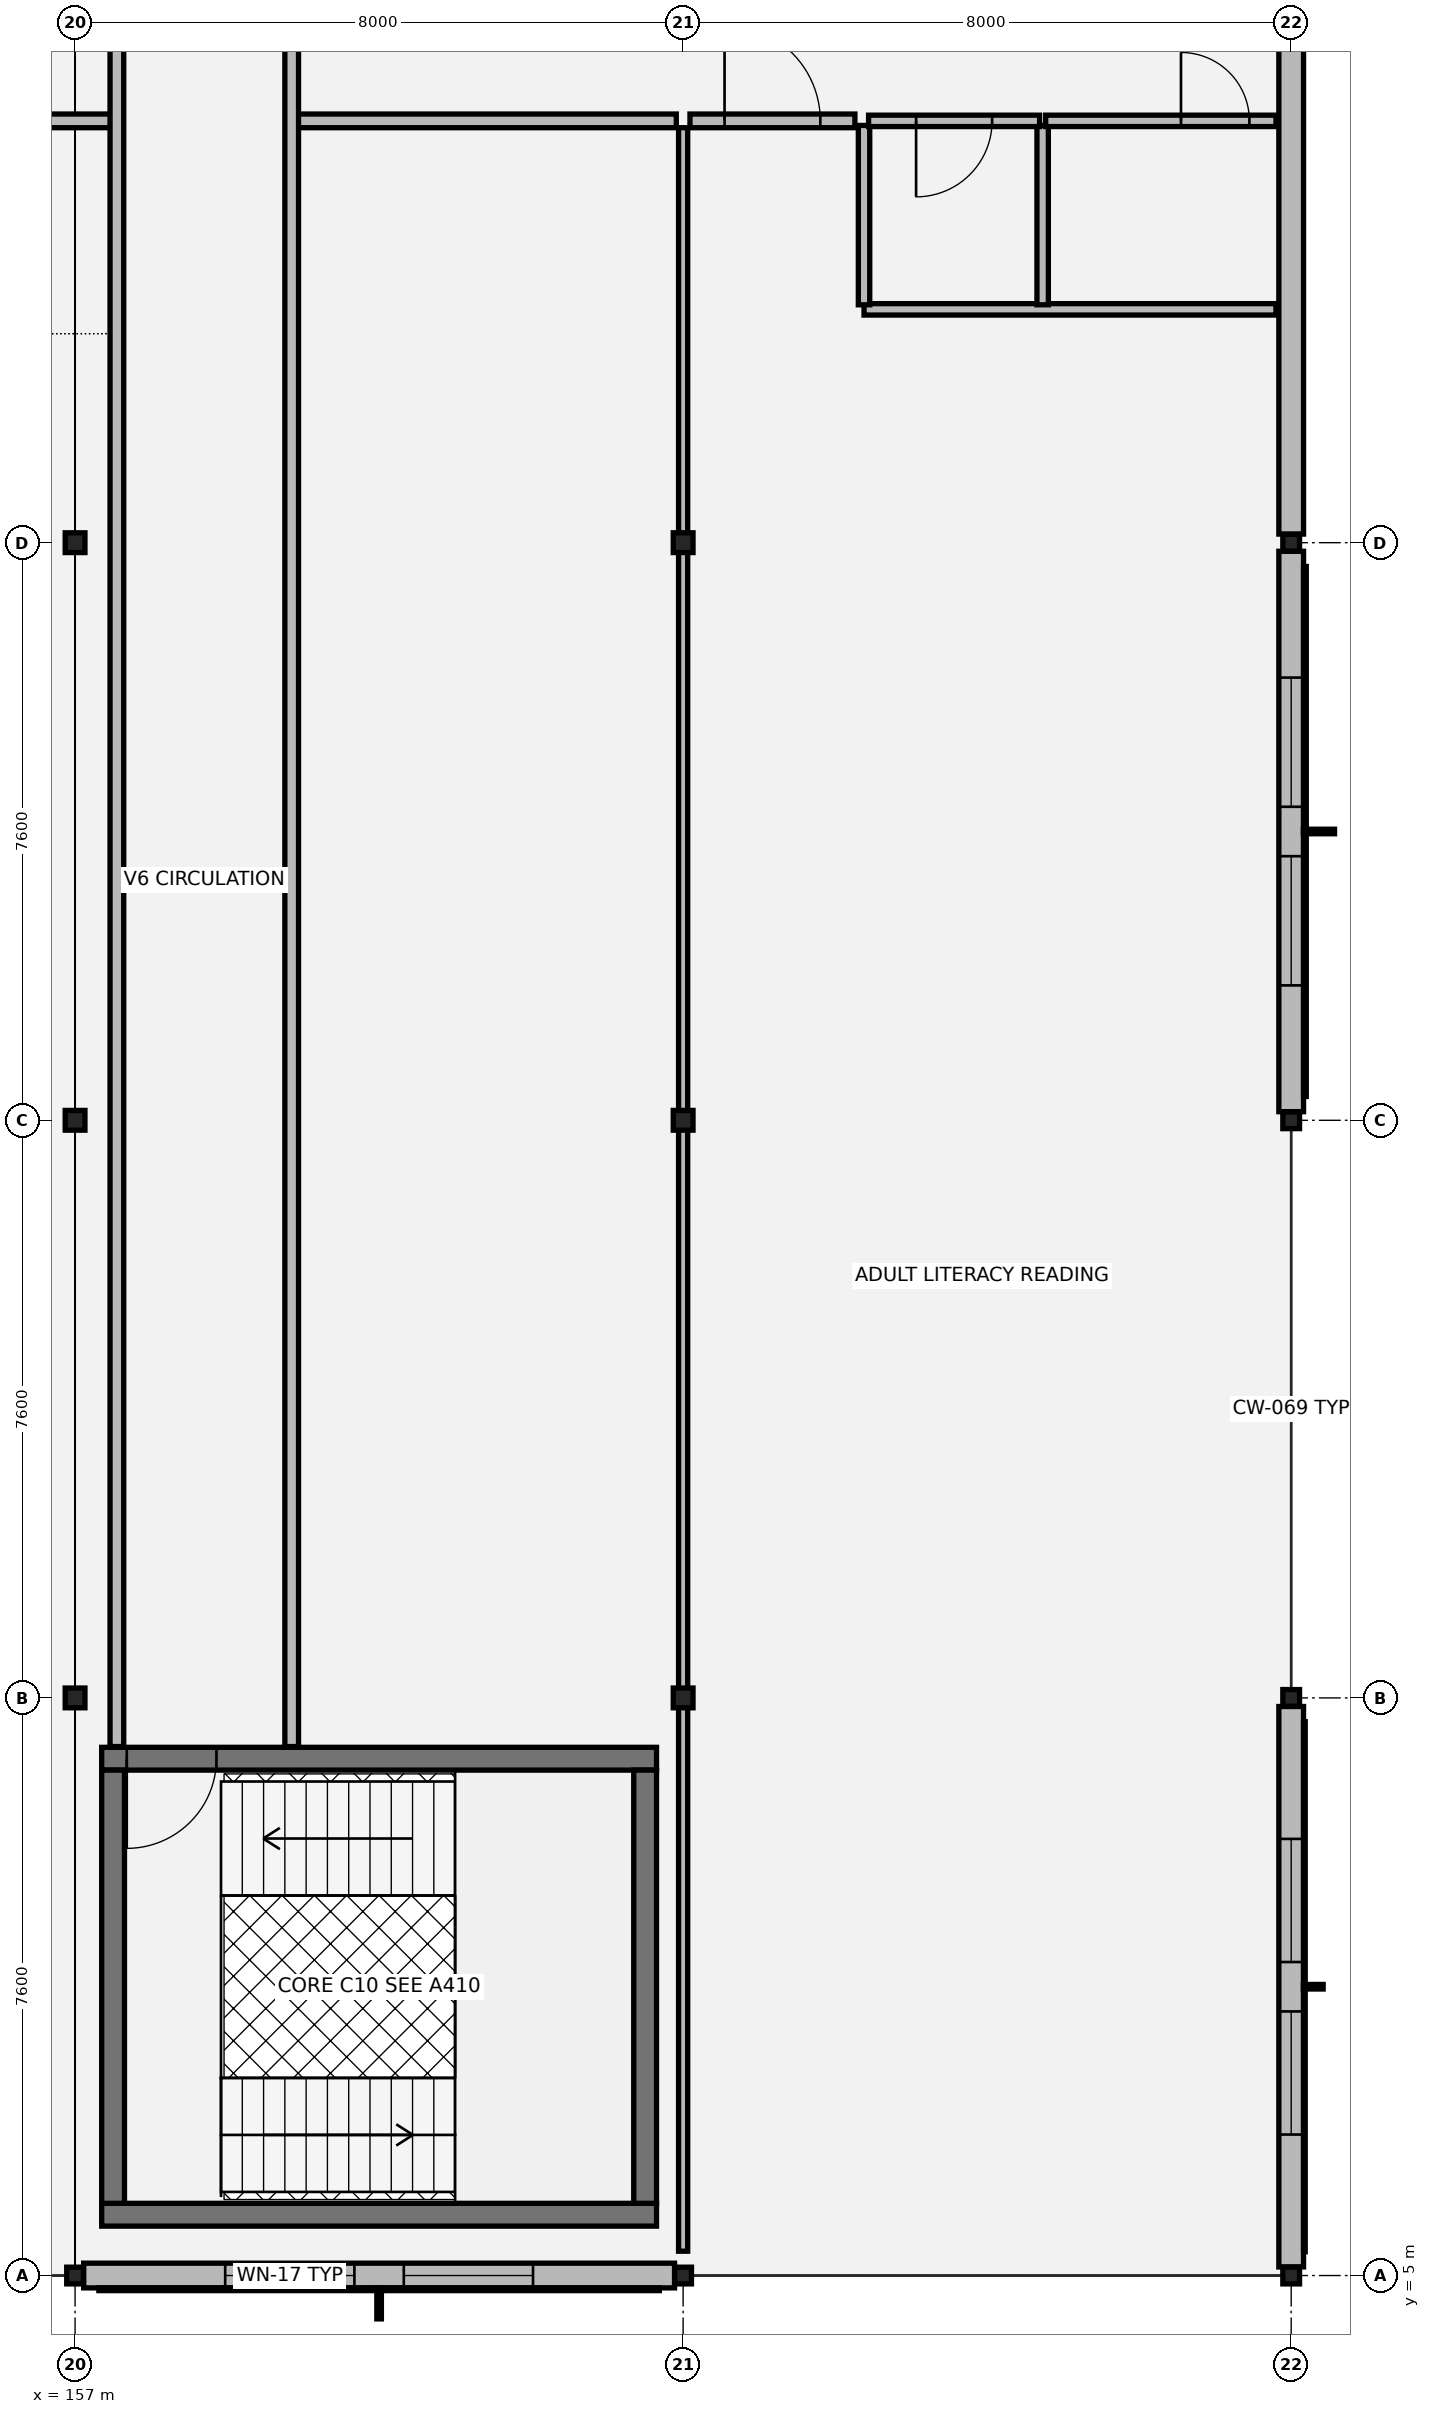
"""IFC4 building model, lengths in metres.
Left out: names, types, materials, properties, quantities, classifications, styles, units other than length and angle.
Written with IfcOpenShell. Run it as: python <this file> out.ifc"""

import sys

from ifc_helpers import new_model, si_unit, direction, frame, frame_2d, origin, origin_2d, place, context, subcontext, project, spatial, rectangle, hollow_rectangle, i_section, extrude, element, fill, save


model = new_model("IFC4")
c1 = context("Model", 3, precision=1e-05, world=origin(), true_north=direction((0.0, 1.0)))
c2 = subcontext(c1, "Body", "Model", "MODEL_VIEW")
j1 = project(units=[si_unit("LENGTHUNIT", "METRE"), si_unit("PLANEANGLEUNIT", "RADIAN")], contexts=[c1])
p1 = place(None, origin())
s1 = spatial("IfcSite", under=j1, at=p1, CompositionType="ELEMENT")
p2 = place(p1, origin())
s2 = spatial("IfcBuilding", under=s1, at=p2, CompositionType="ELEMENT")
p3 = place(p2, frame((0.0, 0.0, 13.26)))
s3 = spatial("IfcBuildingStorey", under=s2, at=p3, CompositionType="ELEMENT", Elevation=13.26)
p4 = place(p3, frame((157.0, 5.0, 0.0), z_axis=(0.0, 0.0, 1.0), x_axis=(1.0, 0.0, 0.0)))
e1 = element("IfcColumn", 1, at=p4, inside=s3, PredefinedType="COLUMN", context=c2, shape_type="SweptSolid", body=[
    extrude(hollow_rectangle(XDim=0.22, YDim=0.22, WallThickness=0.01, at=origin_2d()), origin(), (0.0, 0.0, 1.0), 4.055),
])
for number, where, z_axis, x_axis in (
    (2, (157.0, 12.6, 0.0), (0.0, 0.0, 1.0), (1.0, 0.0, 0.0)),
    (3, (157.0, 20.2, 0.0), (0.0, 0.0, 1.0), (1.0, 0.0, 0.0)),
    (4, (157.0, 27.8, 0.0), (0.0, 0.0, 1.0), (1.0, 0.0, 0.0)),
):
    element("IfcColumn", number, at=place(p3, frame(where, z_axis=z_axis, x_axis=x_axis)), inside=s3, PredefinedType="COLUMN", context=c2, shape_type="SweptSolid", body=[
        extrude(i_section(OverallWidth=0.26, OverallDepth=0.26, WebThickness=0.01, FlangeThickness=0.018, at=origin_2d()), origin(), (0.0, 0.0, 1.0), 4.055),
    ])
p5 = place(p3, frame((165.0, 5.0, 0.0), z_axis=(0.0, 0.0, 1.0), x_axis=(1.0, 0.0, 0.0)))
e5 = element("IfcColumn", 5, at=p5, inside=s3, PredefinedType="COLUMN", context=c2, shape_type="SweptSolid", body=[
    extrude(hollow_rectangle(XDim=0.22, YDim=0.22, WallThickness=0.01, at=origin_2d()), origin(), (0.0, 0.0, 1.0), 4.055),
])
for number, where, z_axis, x_axis in (
    (6, (165.0, 12.6, 0.0), (0.0, 0.0, 1.0), (1.0, 0.0, 0.0)),
    (7, (165.0, 20.2, 0.0), (0.0, 0.0, 1.0), (1.0, 0.0, 0.0)),
    (8, (165.0, 27.8, 0.0), (0.0, 0.0, 1.0), (1.0, 0.0, 0.0)),
):
    element("IfcColumn", number, at=place(p3, frame(where, z_axis=z_axis, x_axis=x_axis)), inside=s3, PredefinedType="COLUMN", context=c2, shape_type="SweptSolid", body=[
        extrude(i_section(OverallWidth=0.26, OverallDepth=0.26, WebThickness=0.01, FlangeThickness=0.018, at=origin_2d()), origin(), (0.0, 0.0, 1.0), 4.055),
    ])
for number, where, z_axis, x_axis in (
    (9, (173.0, 5.0, 0.0), (0.0, 0.0, 1.0), (1.0, 0.0, 0.0)),
    (10, (173.0, 12.6, 0.0), (0.0, 0.0, 1.0), (1.0, 0.0, 0.0)),
    (11, (173.0, 20.2, 0.0), (0.0, 0.0, 1.0), (1.0, 0.0, 0.0)),
    (12, (173.0, 27.8, 0.0), (0.0, 0.0, 1.0), (1.0, 0.0, 0.0)),
):
    element("IfcColumn", number, at=place(p3, frame(where, z_axis=z_axis, x_axis=x_axis)), inside=s3, PredefinedType="COLUMN", context=c2, shape_type="SweptSolid", body=[
        extrude(hollow_rectangle(XDim=0.22, YDim=0.22, WallThickness=0.01, at=origin_2d()), origin(), (0.0, 0.0, 1.0), 4.055),
    ])
p6 = place(p3, frame((157.113, 5.0, 0.0), z_axis=(0.0, 0.0, 1.0), x_axis=(1.0, 0.0, 0.0)))
e13 = element("IfcWall", 13, at=p6, inside=s3, PredefinedType="SOLIDWALL", context=c2, shape_type="SweptSolid", body=[
    extrude(rectangle(XDim=7.774, YDim=0.325, at=frame_2d((3.887, 0.0))), origin(), (0.0, 0.0, 1.0), 3.48),
])
p7 = place(p6, frame((1.862, 0.0, 0.8)))
e14 = element("IfcOpeningElement", 14, at=p7, cuts=e13, PredefinedType="OPENING", context=c2, shape_type="SweptSolid", body=[
    extrude(rectangle(XDim=1.7, YDim=2.2, at=frame_2d((0.85, 1.1))), frame((0.0, 0.172, 0.0), z_axis=(0.0, -1.0, 0.0), x_axis=(1.0, 0.0, 0.0)), (0.0, 0.0, 1.0), 0.345),
])
p8 = place(p6, frame((4.212, 0.0, 0.8)))
e15 = element("IfcOpeningElement", 15, at=p8, cuts=e13, PredefinedType="OPENING", context=c2, shape_type="SweptSolid", body=[
    extrude(rectangle(XDim=1.7, YDim=2.2, at=frame_2d((0.85, 1.1))), frame((0.0, 0.172, 0.0), z_axis=(0.0, -1.0, 0.0), x_axis=(1.0, 0.0, 0.0)), (0.0, 0.0, 1.0), 0.345),
])
p9 = place(p3, frame((173.0, 5.113, 0.0), z_axis=(0.0, 0.0, 1.0), x_axis=(0.0, 1.0, 0.0)))
e16 = element("IfcWall", 16, at=p9, inside=s3, PredefinedType="SOLIDWALL", context=c2, shape_type="SweptSolid", body=[
    extrude(rectangle(XDim=7.374, YDim=0.325, at=frame_2d((3.687, 0.0))), origin(), (0.0, 0.0, 1.0), 3.48),
])
p10 = place(p9, frame((1.742, 0.0, 0.8)))
e17 = element("IfcOpeningElement", 17, at=p10, cuts=e16, PredefinedType="OPENING", context=c2, shape_type="SweptSolid", body=[
    extrude(rectangle(XDim=1.62, YDim=2.06, at=frame_2d((0.81, 1.03))), frame((0.0, 0.172, 0.0), z_axis=(0.0, -1.0, 0.0), x_axis=(1.0, 0.0, 0.0)), (0.0, 0.0, 1.0), 0.345),
])
p11 = place(p9, frame((4.012, 0.0, 0.8)))
e18 = element("IfcOpeningElement", 18, at=p11, cuts=e16, PredefinedType="OPENING", context=c2, shape_type="SweptSolid", body=[
    extrude(rectangle(XDim=1.62, YDim=2.06, at=frame_2d((0.81, 1.03))), frame((0.0, 0.172, 0.0), z_axis=(0.0, -1.0, 0.0), x_axis=(1.0, 0.0, 0.0)), (0.0, 0.0, 1.0), 0.345),
])
p12 = place(p3, frame((173.0, 20.313, 0.0), z_axis=(0.0, 0.0, 1.0), x_axis=(0.0, 1.0, 0.0)))
e19 = element("IfcWall", 19, at=p12, inside=s3, PredefinedType="SOLIDWALL", context=c2, shape_type="SweptSolid", body=[
    extrude(rectangle(XDim=7.374, YDim=0.325, at=frame_2d((3.687, 0.0))), origin(), (0.0, 0.0, 1.0), 3.48),
])
p13 = place(p12, frame((1.662, 0.0, 0.8)))
e20 = element("IfcOpeningElement", 20, at=p13, cuts=e19, PredefinedType="OPENING", context=c2, shape_type="SweptSolid", body=[
    extrude(rectangle(XDim=1.7, YDim=2.2, at=frame_2d((0.85, 1.1))), frame((0.0, 0.172, 0.0), z_axis=(0.0, -1.0, 0.0), x_axis=(1.0, 0.0, 0.0)), (0.0, 0.0, 1.0), 0.345),
])
p14 = place(p12, frame((4.012, 0.0, 0.8)))
e21 = element("IfcOpeningElement", 21, at=p14, cuts=e19, PredefinedType="OPENING", context=c2, shape_type="SweptSolid", body=[
    extrude(rectangle(XDim=1.7, YDim=2.2, at=frame_2d((0.85, 1.1))), frame((0.0, 0.172, 0.0), z_axis=(0.0, -1.0, 0.0), x_axis=(1.0, 0.0, 0.0)), (0.0, 0.0, 1.0), 0.345),
])
p15 = place(p3, frame((173.0, 27.913, 0.0), z_axis=(0.0, 0.0, 1.0), x_axis=(0.0, 1.0, 0.0)))
e22 = element("IfcWall", 22, at=p15, inside=s3, PredefinedType="SOLIDWALL", context=c2, shape_type="SweptSolid", body=[
    extrude(rectangle(XDim=7.374, YDim=0.325, at=frame_2d((3.687, 0.0))), origin(), (0.0, 0.0, 1.0), 3.48),
])
p16 = place(p3, frame((157.35, 5.8, 0.0), z_axis=(0.0, 0.0, 1.0), x_axis=(1.0, 0.0, 0.0)))
e23 = element("IfcWall", 23, at=p16, inside=s3, PredefinedType="SHEAR", context=c2, shape_type="SweptSolid", body=[
    extrude(rectangle(XDim=7.3, YDim=0.3, at=frame_2d((3.65, 0.0))), origin(), (0.0, 0.0, 1.0), 3.845),
])
p17 = place(p3, frame((157.35, 11.8, 0.0), z_axis=(0.0, 0.0, 1.0), x_axis=(1.0, 0.0, 0.0)))
e24 = element("IfcWall", 24, at=p17, inside=s3, PredefinedType="SHEAR", context=c2, shape_type="SweptSolid", body=[
    extrude(rectangle(XDim=7.3, YDim=0.3, at=frame_2d((3.65, 0.0))), origin(), (0.0, 0.0, 1.0), 3.845),
])
p18 = place(p17, frame((0.33, 0.0, 0.0)))
e25 = element("IfcOpeningElement", 25, at=p18, cuts=e24, PredefinedType="OPENING", context=c2, shape_type="SweptSolid", body=[
    extrude(rectangle(XDim=1.18, YDim=2.18, at=frame_2d((0.59, 1.09))), frame((0.0, 0.16, 0.0), z_axis=(0.0, -1.0, 0.0), x_axis=(1.0, 0.0, 0.0)), (0.0, 0.0, 1.0), 0.32),
])
for number, where, z_axis, x_axis in (
    (26, (157.5, 5.95, 0.0), (0.0, 0.0, 1.0), (0.0, 1.0, 0.0)),
    (27, (164.5, 5.95, 0.0), (0.0, 0.0, 1.0), (0.0, 1.0, 0.0)),
):
    element("IfcWall", number, at=place(p3, frame(where, z_axis=z_axis, x_axis=x_axis)), inside=s3, PredefinedType="SHEAR", context=c2, shape_type="SweptSolid", body=[
        extrude(rectangle(XDim=5.7, YDim=0.3, at=frame_2d((2.85, 0.0))), origin(), (0.0, 0.0, 1.0), 3.845),
    ])
p19 = place(p3, frame((167.38, 30.87, 0.0), z_axis=(0.0, 0.0, 1.0), x_axis=(1.0, 0.0, 0.0)))
e28 = element("IfcWall", 28, at=p19, inside=s3, PredefinedType="PARTITIONING", context=c2, shape_type="SweptSolid", body=[
    extrude(rectangle(XDim=5.42, YDim=0.15, at=frame_2d((2.71, 0.0))), origin(), (0.0, 0.0, 1.0), 3.18),
])
for number, where, z_axis, x_axis in (
    (29, (167.38, 30.93, 0.0), (0.0, 0.0, 1.0), (0.0, 1.0, 0.0)),
    (30, (169.73, 30.93, 0.0), (0.0, 0.0, 1.0), (0.0, 1.0, 0.0)),
):
    element("IfcWall", number, at=place(p3, frame(where, z_axis=z_axis, x_axis=x_axis)), inside=s3, PredefinedType="PARTITIONING", context=c2, shape_type="SweptSolid", body=[
        extrude(rectangle(XDim=2.36, YDim=0.15, at=frame_2d((1.18, 0.0))), origin(), (0.0, 0.0, 1.0), 3.18),
    ])
p20 = place(p3, frame((167.44, 33.35, 0.0), z_axis=(0.0, 0.0, 1.0), x_axis=(1.0, 0.0, 0.0)))
e31 = element("IfcWall", 31, at=p20, inside=s3, PredefinedType="PARTITIONING", context=c2, shape_type="SweptSolid", body=[
    extrude(rectangle(XDim=2.25, YDim=0.15, at=frame_2d((1.125, 0.0))), origin(), (0.0, 0.0, 1.0), 3.18),
])
p21 = place(p20, frame((0.625, 0.0, 0.0)))
e32 = element("IfcOpeningElement", 32, at=p21, cuts=e31, PredefinedType="OPENING", context=c2, shape_type="SweptSolid", body=[
    extrude(rectangle(XDim=1.0, YDim=2.15, at=frame_2d((0.5, 1.075))), frame((0.0, 0.085, 0.0), z_axis=(0.0, -1.0, 0.0), x_axis=(1.0, 0.0, 0.0)), (0.0, 0.0, 1.0), 0.17),
])
p22 = place(p3, frame((169.77, 33.35, 0.0), z_axis=(0.0, 0.0, 1.0), x_axis=(1.0, 0.0, 0.0)))
e33 = element("IfcWall", 33, at=p22, inside=s3, PredefinedType="PARTITIONING", context=c2, shape_type="SweptSolid", body=[
    extrude(rectangle(XDim=3.03, YDim=0.15, at=frame_2d((1.515, 0.0))), origin(), (0.0, 0.0, 1.0), 3.18),
])
p23 = place(p22, frame((1.78, 0.0, 0.0)))
e34 = element("IfcOpeningElement", 34, at=p23, cuts=e33, PredefinedType="OPENING", context=c2, shape_type="SweptSolid", body=[
    extrude(rectangle(XDim=0.9, YDim=2.15, at=frame_2d((0.45, 1.075))), frame((0.0, 0.085, 0.0), z_axis=(0.0, -1.0, 0.0), x_axis=(1.0, 0.0, 0.0)), (0.0, 0.0, 1.0), 0.17),
])
p24 = place(p3, frame((149.09, 33.35, 0.0), z_axis=(0.0, 0.0, 1.0), x_axis=(1.0, 0.0, 0.0)))
e35 = element("IfcWall", 35, at=p24, inside=s3, PredefinedType="PARTITIONING", context=c2, shape_type="SweptSolid", body=[
    extrude(rectangle(XDim=8.46, YDim=0.18, at=frame_2d((4.23, 0.0))), origin(), (0.0, 0.0, 1.0), 3.18),
])
p25 = place(p24, frame((3.53, 0.0, 0.0)))
e36 = element("IfcOpeningElement", 36, at=p25, cuts=e35, PredefinedType="OPENING", context=c2, shape_type="SweptSolid", body=[
    extrude(rectangle(XDim=1.4, YDim=2.22, at=frame_2d((0.7, 1.11))), frame((0.0, 0.1, 0.0), z_axis=(0.0, -1.0, 0.0), x_axis=(1.0, 0.0, 0.0)), (0.0, 0.0, 1.0), 0.2),
])
p26 = place(p3, frame((159.85, 33.35, 0.0), z_axis=(0.0, 0.0, 1.0), x_axis=(1.0, 0.0, 0.0)))
e37 = element("IfcWall", 37, at=p26, inside=s3, PredefinedType="PARTITIONING", context=c2, shape_type="SweptSolid", body=[
    extrude(rectangle(XDim=5.06, YDim=0.18, at=frame_2d((2.53, 0.0))), origin(), (0.0, 0.0, 1.0), 3.18),
])
p27 = place(p3, frame((165.09, 33.35, 0.0), z_axis=(0.0, 0.0, 1.0), x_axis=(1.0, 0.0, 0.0)))
e38 = element("IfcWall", 38, at=p27, inside=s3, PredefinedType="PARTITIONING", context=c2, shape_type="SweptSolid", body=[
    extrude(rectangle(XDim=2.17, YDim=0.18, at=frame_2d((1.085, 0.0))), origin(), (0.0, 0.0, 1.0), 3.18),
])
p28 = place(p27, frame((0.455, 0.0, 0.0)))
e39 = element("IfcOpeningElement", 39, at=p28, cuts=e38, PredefinedType="OPENING", context=c2, shape_type="SweptSolid", body=[
    extrude(rectangle(XDim=1.26, YDim=2.2, at=frame_2d((0.63, 1.1))), frame((0.0, 0.1, 0.0), z_axis=(0.0, -1.0, 0.0), x_axis=(1.0, 0.0, 0.0)), (0.0, 0.0, 1.0), 0.2),
])
for number, where, z_axis, x_axis in (
    (40, (157.55, 11.96, 0.0), (0.0, 0.0, 1.0), (0.0, 1.0, 0.0)),
    (41, (159.85, 11.96, 0.0), (0.0, 0.0, 1.0), (0.0, 1.0, 0.0)),
):
    element("IfcWall", number, at=place(p3, frame(where, z_axis=z_axis, x_axis=x_axis)), inside=s3, PredefinedType="PARTITIONING", context=c2, shape_type="SweptSolid", body=[
        extrude(rectangle(XDim=24.08, YDim=0.18, at=frame_2d((12.04, 0.0))), origin(), (0.0, 0.0, 1.0), 3.18),
    ])
p29 = place(p3, frame((165.0, 5.32, 0.0), z_axis=(0.0, 0.0, 1.0), x_axis=(0.0, 1.0, 0.0)))
e42 = element("IfcWall", 42, at=p29, inside=s3, PredefinedType="PARTITIONING", context=c2, shape_type="SweptSolid", body=[
    extrude(rectangle(XDim=27.94, YDim=0.12, at=frame_2d((13.97, 0.0))), origin(), (0.0, 0.0, 1.0), 3.18),
])
p30 = place(p7, origin())
e43 = element("IfcWindow", 43, at=p30, inside=s3, PartitioningType="SINGLE_PANEL", PredefinedType="WINDOW", context=c2, shape_type="SweptSolid", body=[
    extrude(rectangle(XDim=1.7, YDim=2.2, at=frame_2d((0.85, 1.1))), frame((0.0, 0.03, 0.0), z_axis=(0.0, -1.0, 0.0), x_axis=(1.0, 0.0, 0.0)), (0.0, 0.0, 1.0), 0.06),
])
fill(e14, e43)
p31 = place(p8, origin())
e44 = element("IfcWindow", 44, at=p31, inside=s3, PartitioningType="SINGLE_PANEL", PredefinedType="WINDOW", context=c2, shape_type="SweptSolid", body=[
    extrude(rectangle(XDim=1.7, YDim=2.2, at=frame_2d((0.85, 1.1))), frame((0.0, 0.03, 0.0), z_axis=(0.0, -1.0, 0.0), x_axis=(1.0, 0.0, 0.0)), (0.0, 0.0, 1.0), 0.06),
])
fill(e15, e44)
p32 = place(p10, origin())
e45 = element("IfcWindow", 45, at=p32, inside=s3, PartitioningType="SINGLE_PANEL", PredefinedType="WINDOW", context=c2, shape_type="SweptSolid", body=[
    extrude(rectangle(XDim=1.62, YDim=2.06, at=frame_2d((0.81, 1.03))), frame((0.0, 0.03, 0.0), z_axis=(0.0, -1.0, 0.0), x_axis=(1.0, 0.0, 0.0)), (0.0, 0.0, 1.0), 0.06),
])
fill(e17, e45)
p33 = place(p11, origin())
e46 = element("IfcWindow", 46, at=p33, inside=s3, PartitioningType="SINGLE_PANEL", PredefinedType="WINDOW", context=c2, shape_type="SweptSolid", body=[
    extrude(rectangle(XDim=1.62, YDim=2.06, at=frame_2d((0.81, 1.03))), frame((0.0, 0.03, 0.0), z_axis=(0.0, -1.0, 0.0), x_axis=(1.0, 0.0, 0.0)), (0.0, 0.0, 1.0), 0.06),
])
fill(e18, e46)
p34 = place(p13, origin())
e47 = element("IfcWindow", 47, at=p34, inside=s3, PartitioningType="SINGLE_PANEL", PredefinedType="WINDOW", context=c2, shape_type="SweptSolid", body=[
    extrude(rectangle(XDim=1.7, YDim=2.2, at=frame_2d((0.85, 1.1))), frame((0.0, 0.03, 0.0), z_axis=(0.0, -1.0, 0.0), x_axis=(1.0, 0.0, 0.0)), (0.0, 0.0, 1.0), 0.06),
])
fill(e20, e47)
p35 = place(p14, origin())
e48 = element("IfcWindow", 48, at=p35, inside=s3, PartitioningType="SINGLE_PANEL", PredefinedType="WINDOW", context=c2, shape_type="SweptSolid", body=[
    extrude(rectangle(XDim=1.7, YDim=2.2, at=frame_2d((0.85, 1.1))), frame((0.0, 0.03, 0.0), z_axis=(0.0, -1.0, 0.0), x_axis=(1.0, 0.0, 0.0)), (0.0, 0.0, 1.0), 0.06),
])
fill(e21, e48)
p36 = place(p18, origin())
e49 = element("IfcDoor", 49, at=p36, inside=s3, OperationType="SINGLE_SWING_RIGHT", PredefinedType="DOOR", context=c2, shape_type="SweptSolid", body=[
    extrude(rectangle(XDim=1.18, YDim=2.18, at=frame_2d((0.59, 1.09))), frame((0.0, 0.025, 0.0), z_axis=(0.0, -1.0, 0.0), x_axis=(1.0, 0.0, 0.0)), (0.0, 0.0, 1.0), 0.05),
])
fill(e25, e49)
p37 = place(p21, origin())
e50 = element("IfcDoor", 50, at=p37, inside=s3, OperationType="SINGLE_SWING_RIGHT", PredefinedType="DOOR", context=c2, shape_type="SweptSolid", body=[
    extrude(rectangle(XDim=1.0, YDim=2.15, at=frame_2d((0.5, 1.075))), frame((0.0, 0.025, 0.0), z_axis=(0.0, -1.0, 0.0), x_axis=(1.0, 0.0, 0.0)), (0.0, 0.0, 1.0), 0.05),
])
fill(e32, e50)
p38 = place(p23, origin())
e51 = element("IfcDoor", 51, at=p38, inside=s3, OperationType="SINGLE_SWING_LEFT", PredefinedType="DOOR", context=c2, shape_type="SweptSolid", body=[
    extrude(rectangle(XDim=0.9, YDim=2.15, at=frame_2d((0.45, 1.075))), frame((0.0, 0.025, 0.0), z_axis=(0.0, -1.0, 0.0), x_axis=(1.0, 0.0, 0.0)), (0.0, 0.0, 1.0), 0.05),
])
fill(e34, e51)
p39 = place(p28, origin())
e52 = element("IfcDoor", 52, at=p39, inside=s3, OperationType="SINGLE_SWING_LEFT", PredefinedType="DOOR", context=c2, shape_type="SweptSolid", body=[
    extrude(rectangle(XDim=1.26, YDim=2.2, at=frame_2d((0.63, 1.1))), frame((0.0, 0.025, 0.0), z_axis=(0.0, -1.0, 0.0), x_axis=(1.0, 0.0, 0.0)), (0.0, 0.0, 1.0), 0.05),
])
fill(e39, e52)
save(model, sys.argv[1])
